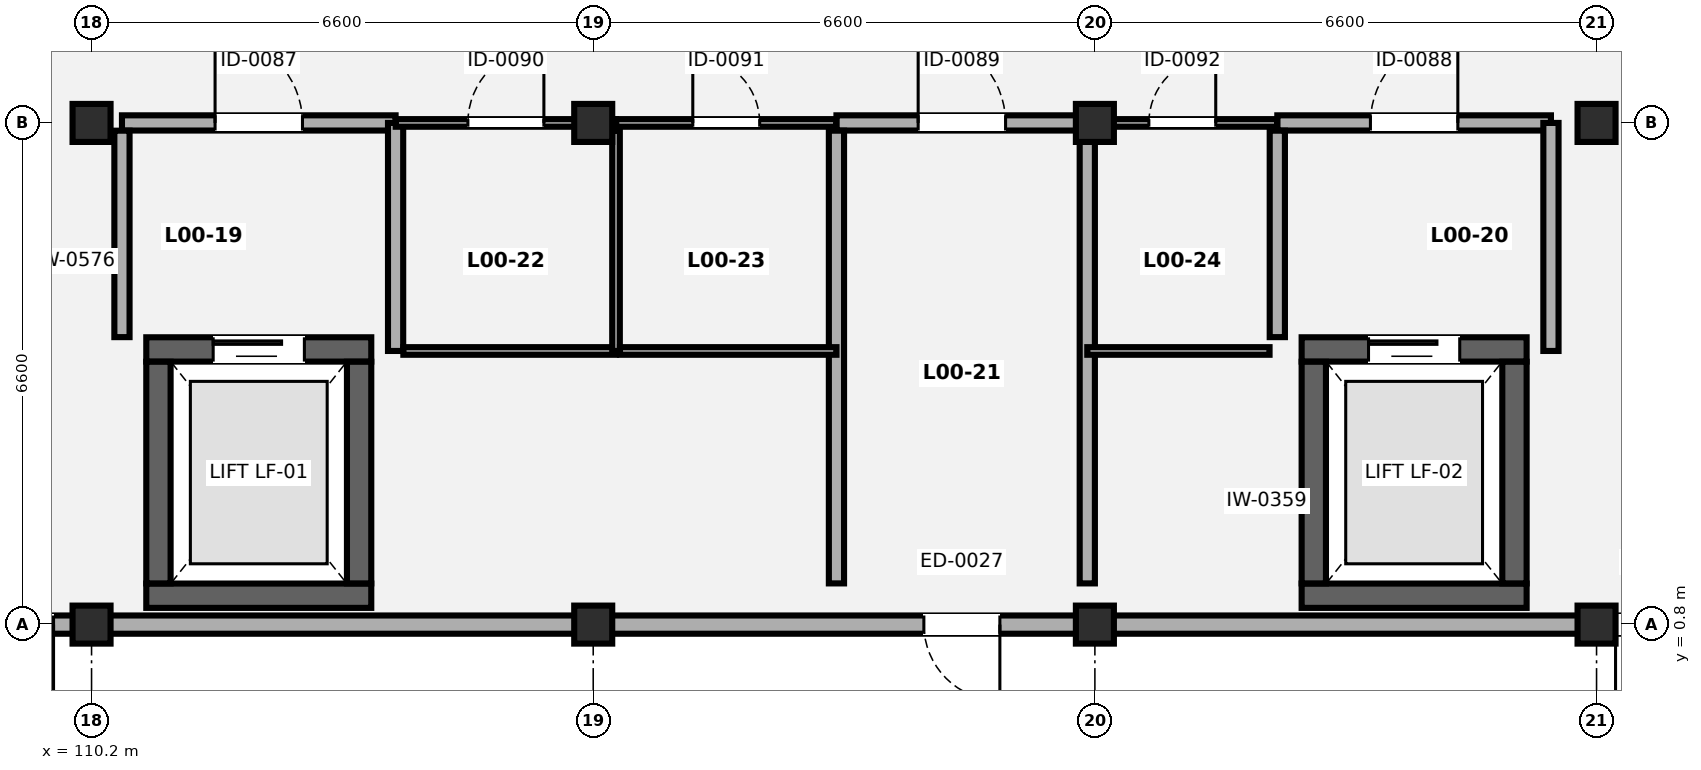
"""IFC4 building model, lengths in metres.
Left out: names, types, materials, properties, quantities, classifications, styles, units other than length and angle.
Written with IfcOpenShell. Run it as: python <this file> out.ifc"""

import sys

from ifc_helpers import new_model, si_unit, direction, frame, frame_2d, origin, origin_2d, place, context, subcontext, project, spatial, rectangle, i_section, extrude, element, fill, save


model = new_model("IFC4")
c1 = context("Model", 3, precision=1e-05, world=origin(), true_north=direction((0.0, 1.0)))
c2 = subcontext(c1, "Body", "Model", "MODEL_VIEW")
j1 = project(units=[si_unit("LENGTHUNIT", "METRE"), si_unit("PLANEANGLEUNIT", "RADIAN")], contexts=[c1])
p1 = place(None, origin())
s1 = spatial("IfcSite", under=j1, at=p1, CompositionType="ELEMENT")
p2 = place(p1, origin())
s2 = spatial("IfcBuilding", under=s1, at=p2, CompositionType="ELEMENT")
p3 = place(p2, origin())
s3 = spatial("IfcBuildingStorey", under=s2, at=p3, CompositionType="ELEMENT", Elevation=0.0)
for number, where, z_axis, x_axis in (
    (1, (110.2, 0.8, 0.0), (0.0, 0.0, 1.0), (1.0, 0.0, 0.0)),
    (2, (110.2, 7.4, 0.0), (0.0, 0.0, 1.0), (1.0, 0.0, 0.0)),
    (3, (116.8, 0.8, 0.0), (0.0, 0.0, 1.0), (1.0, 0.0, 0.0)),
    (4, (116.8, 7.4, 0.0), (0.0, 0.0, 1.0), (1.0, 0.0, 0.0)),
    (5, (123.4, 0.8, 0.0), (0.0, 0.0, 1.0), (1.0, 0.0, 0.0)),
    (6, (123.4, 7.4, 0.0), (0.0, 0.0, 1.0), (1.0, 0.0, 0.0)),
    (7, (130.0, 0.8, 0.0), (0.0, 0.0, 1.0), (1.0, 0.0, 0.0)),
    (8, (130.0, 7.4, 0.0), (0.0, 0.0, 1.0), (1.0, 0.0, 0.0)),
):
    element("IfcColumn", number, at=place(p3, frame(where, z_axis=z_axis, x_axis=x_axis)), inside=s3, PredefinedType="COLUMN", context=c2, shape_type="SweptSolid", body=[
        extrude(i_section(OverallWidth=0.5, OverallDepth=0.5, WebThickness=0.022, FlangeThickness=0.04, FilletRadius=0.016, at=origin_2d()), origin(), (0.0, 0.0, 1.0), 4.9),
    ])
p4 = place(p3, frame((161.952, 0.8, 0.0), z_axis=(0.0, 0.0, 1.0), x_axis=(-1.0, 0.0, 0.0)))
e9 = element("IfcWall", 9, at=p4, inside=s3, PredefinedType="SOLIDWALL", context=c2, shape_type="SweptSolid", body=[
    extrude(rectangle(XDim=58.104, YDim=0.24, at=frame_2d((29.052, 0.0))), origin(), (0.0, 0.0, 1.0), 4.205),
])
p5 = place(p4, frame((52.252, 0.0, 0.0)))
e10 = element("IfcOpeningElement", 10, at=p5, cuts=e9, PredefinedType="OPENING", context=c2, shape_type="SweptSolid", body=[
    extrude(rectangle(XDim=1.25, YDim=2.15, at=frame_2d((0.625, 1.075))), frame((0.0, 0.13, 0.0), z_axis=(0.0, -1.0, 0.0), x_axis=(1.0, 0.0, 0.0)), (0.0, 0.0, 1.0), 0.26),
])
p6 = place(p4, frame((30.452, 0.0, 0.0)))
e11 = element("IfcOpeningElement", 11, at=p6, cuts=e9, PredefinedType="OPENING", context=c2, shape_type="SweptSolid", body=[
    extrude(rectangle(XDim=1.25, YDim=2.15, at=frame_2d((0.625, 1.075))), frame((0.0, 0.13, 0.0), z_axis=(0.0, -1.0, 0.0), x_axis=(1.0, 0.0, 0.0)), (0.0, 0.0, 1.0), 0.26),
])
p7 = place(p4, frame((39.802, 0.0, 0.0)))
e12 = element("IfcOpeningElement", 12, at=p7, cuts=e9, PredefinedType="OPENING", context=c2, shape_type="SweptSolid", body=[
    extrude(rectangle(XDim=1.0, YDim=2.1, at=frame_2d((0.5, 1.05))), frame((0.0, 0.13, 0.0), z_axis=(0.0, -1.0, 0.0), x_axis=(1.0, 0.0, 0.0)), (0.0, 0.0, 1.0), 0.26),
])
p8 = place(p4, frame((14.152, 0.0, 0.0)))
e13 = element("IfcOpeningElement", 13, at=p8, cuts=e9, PredefinedType="OPENING", context=c2, shape_type="SweptSolid", body=[
    extrude(rectangle(XDim=2.8, YDim=2.25, at=frame_2d((1.4, 1.125))), frame((0.0, 0.13, 0.0), z_axis=(0.0, -1.0, 0.0), x_axis=(1.0, 0.0, 0.0)), (0.0, 0.0, 1.0), 0.26),
])
p9 = place(p3, frame((110.92, 1.18, 0.0), z_axis=(0.0, 0.0, 1.0), x_axis=(1.0, 0.0, 0.0)))
e14 = element("IfcWall", 14, at=p9, inside=s3, PredefinedType="SHEAR", context=c2, shape_type="SweptSolid", body=[
    extrude(rectangle(XDim=2.96, YDim=0.32, at=frame_2d((1.48, 0.0))), origin(), (0.0, 0.0, 1.0), 4.72),
])
p10 = place(p3, frame((110.92, 4.42, 0.0), z_axis=(0.0, 0.0, 1.0), x_axis=(1.0, 0.0, 0.0)))
e15 = element("IfcWall", 15, at=p10, inside=s3, PredefinedType="SHEAR", context=c2, shape_type="SweptSolid", body=[
    extrude(rectangle(XDim=2.96, YDim=0.32, at=frame_2d((1.48, 0.0))), origin(), (0.0, 0.0, 1.0), 4.72),
])
p11 = place(p10, frame((0.88, 0.0, 0.0)))
e16 = element("IfcOpeningElement", 16, at=p11, cuts=e15, PredefinedType="OPENING", context=c2, shape_type="SweptSolid", body=[
    extrude(rectangle(XDim=1.2, YDim=2.2, at=frame_2d((0.6, 1.1))), frame((0.0, 0.17, 0.0), z_axis=(0.0, -1.0, 0.0), x_axis=(1.0, 0.0, 0.0)), (0.0, 0.0, 1.0), 0.34),
])
for number, where, z_axis, x_axis in (
    (17, (111.08, 1.342, 0.0), (0.0, 0.0, 1.0), (0.0, 1.0, 0.0)),
    (18, (113.72, 1.342, 0.0), (0.0, 0.0, 1.0), (0.0, 1.0, 0.0)),
):
    element("IfcWall", number, at=place(p3, frame(where, z_axis=z_axis, x_axis=x_axis)), inside=s3, PredefinedType="SHEAR", context=c2, shape_type="SweptSolid", body=[
        extrude(rectangle(XDim=2.916, YDim=0.32, at=frame_2d((1.458, 0.0))), origin(), (0.0, 0.0, 1.0), 4.72),
    ])
p12 = place(p3, frame((126.12, 1.18, 0.0), z_axis=(0.0, 0.0, 1.0), x_axis=(1.0, 0.0, 0.0)))
e19 = element("IfcWall", 19, at=p12, inside=s3, PredefinedType="SHEAR", context=c2, shape_type="SweptSolid", body=[
    extrude(rectangle(XDim=2.96, YDim=0.32, at=frame_2d((1.48, 0.0))), origin(), (0.0, 0.0, 1.0), 4.72),
])
p13 = place(p3, frame((126.12, 4.42, 0.0), z_axis=(0.0, 0.0, 1.0), x_axis=(1.0, 0.0, 0.0)))
e20 = element("IfcWall", 20, at=p13, inside=s3, PredefinedType="SHEAR", context=c2, shape_type="SweptSolid", body=[
    extrude(rectangle(XDim=2.96, YDim=0.32, at=frame_2d((1.48, 0.0))), origin(), (0.0, 0.0, 1.0), 4.72),
])
p14 = place(p13, frame((0.88, 0.0, 0.0)))
e21 = element("IfcOpeningElement", 21, at=p14, cuts=e20, PredefinedType="OPENING", context=c2, shape_type="SweptSolid", body=[
    extrude(rectangle(XDim=1.2, YDim=2.2, at=frame_2d((0.6, 1.1))), frame((0.0, 0.17, 0.0), z_axis=(0.0, -1.0, 0.0), x_axis=(1.0, 0.0, 0.0)), (0.0, 0.0, 1.0), 0.34),
])
for number, where, z_axis, x_axis in (
    (22, (126.28, 1.342, 0.0), (0.0, 0.0, 1.0), (0.0, 1.0, 0.0)),
    (23, (128.92, 1.342, 0.0), (0.0, 0.0, 1.0), (0.0, 1.0, 0.0)),
):
    element("IfcWall", number, at=place(p3, frame(where, z_axis=z_axis, x_axis=x_axis)), inside=s3, PredefinedType="SHEAR", context=c2, shape_type="SweptSolid", body=[
        extrude(rectangle(XDim=2.916, YDim=0.32, at=frame_2d((1.458, 0.0))), origin(), (0.0, 0.0, 1.0), 4.72),
    ])
p15 = place(p3, frame((110.6, 7.4, 0.0), z_axis=(0.0, 0.0, 1.0), x_axis=(1.0, 0.0, 0.0)))
e24 = element("IfcWall", 24, at=p15, inside=s3, PredefinedType="SOLIDWALL", context=c2, shape_type="SweptSolid", body=[
    extrude(rectangle(XDim=3.6, YDim=0.2, at=frame_2d((1.8, 0.0))), origin(), (0.0, 0.0, 1.0), 3.993),
])
p16 = place(p15, frame((1.225, 0.0, 0.0)))
e25 = element("IfcOpeningElement", 25, at=p16, cuts=e24, PredefinedType="OPENING", context=c2, shape_type="SweptSolid", body=[
    extrude(rectangle(XDim=1.15, YDim=2.15, at=frame_2d((0.575, 1.075))), frame((0.0, 0.11, 0.0), z_axis=(0.0, -1.0, 0.0), x_axis=(1.0, 0.0, 0.0)), (0.0, 0.0, 1.0), 0.22),
])
p17 = place(p3, frame((110.6, 4.582, 0.0), z_axis=(0.0, 0.0, 1.0), x_axis=(0.0, 1.0, 0.0)))
e26 = element("IfcWall", 26, at=p17, inside=s3, PredefinedType="SOLIDWALL", context=c2, shape_type="SweptSolid", body=[
    extrude(rectangle(XDim=2.716, YDim=0.2, at=frame_2d((1.358, 0.0))), origin(), (0.0, 0.0, 1.0), 4.72),
])
p18 = place(p3, frame((114.2, 4.4, 0.0), z_axis=(0.0, 0.0, 1.0), x_axis=(0.0, 1.0, 0.0)))
e27 = element("IfcWall", 27, at=p18, inside=s3, PredefinedType="SOLIDWALL", context=c2, shape_type="SweptSolid", body=[
    extrude(rectangle(XDim=3.0, YDim=0.2, at=frame_2d((1.5, 0.0))), origin(), (0.0, 0.0, 1.0), 4.72),
])
p19 = place(p3, frame((125.8, 7.4, 0.0), z_axis=(0.0, 0.0, 1.0), x_axis=(1.0, 0.0, 0.0)))
e28 = element("IfcWall", 28, at=p19, inside=s3, PredefinedType="SOLIDWALL", context=c2, shape_type="SweptSolid", body=[
    extrude(rectangle(XDim=3.6, YDim=0.2, at=frame_2d((1.8, 0.0))), origin(), (0.0, 0.0, 1.0), 3.993),
])
p20 = place(p19, frame((1.225, 0.0, 0.0)))
e29 = element("IfcOpeningElement", 29, at=p20, cuts=e28, PredefinedType="OPENING", context=c2, shape_type="SweptSolid", body=[
    extrude(rectangle(XDim=1.15, YDim=2.15, at=frame_2d((0.575, 1.075))), frame((0.0, 0.11, 0.0), z_axis=(0.0, -1.0, 0.0), x_axis=(1.0, 0.0, 0.0)), (0.0, 0.0, 1.0), 0.22),
])
p21 = place(p3, frame((125.8, 4.582, 0.0), z_axis=(0.0, 0.0, 1.0), x_axis=(0.0, 1.0, 0.0)))
e30 = element("IfcWall", 30, at=p21, inside=s3, PredefinedType="SOLIDWALL", context=c2, shape_type="SweptSolid", body=[
    extrude(rectangle(XDim=2.716, YDim=0.2, at=frame_2d((1.358, 0.0))), origin(), (0.0, 0.0, 1.0), 4.72),
])
p22 = place(p3, frame((129.4, 4.4, 0.0), z_axis=(0.0, 0.0, 1.0), x_axis=(0.0, 1.0, 0.0)))
e31 = element("IfcWall", 31, at=p22, inside=s3, PredefinedType="SOLIDWALL", context=c2, shape_type="SweptSolid", body=[
    extrude(rectangle(XDim=3.0, YDim=0.2, at=frame_2d((1.5, 0.0))), origin(), (0.0, 0.0, 1.0), 4.72),
])
p23 = place(p3, frame((120.0, 7.4, 0.0), z_axis=(0.0, 0.0, 1.0), x_axis=(1.0, 0.0, 0.0)))
e32 = element("IfcWall", 32, at=p23, inside=s3, PredefinedType="SOLIDWALL", context=c2, shape_type="SweptSolid", body=[
    extrude(rectangle(XDim=3.3, YDim=0.2, at=frame_2d((1.65, 0.0))), origin(), (0.0, 0.0, 1.0), 3.993),
])
p24 = place(p23, frame((1.075, 0.0, 0.0)))
e33 = element("IfcOpeningElement", 33, at=p24, cuts=e32, PredefinedType="OPENING", context=c2, shape_type="SweptSolid", body=[
    extrude(rectangle(XDim=1.15, YDim=2.15, at=frame_2d((0.575, 1.075))), frame((0.0, 0.11, 0.0), z_axis=(0.0, -1.0, 0.0), x_axis=(1.0, 0.0, 0.0)), (0.0, 0.0, 1.0), 0.22),
])
p25 = place(p3, frame((120.0, 1.342, 0.0), z_axis=(0.0, 0.0, 1.0), x_axis=(0.0, 1.0, 0.0)))
e34 = element("IfcWall", 34, at=p25, inside=s3, PredefinedType="SOLIDWALL", context=c2, shape_type="SweptSolid", body=[
    extrude(rectangle(XDim=5.956, YDim=0.2, at=frame_2d((2.978, 0.0))), origin(), (0.0, 0.0, 1.0), 4.72),
])
p26 = place(p3, frame((123.3, 1.342, 0.0), z_axis=(0.0, 0.0, 1.0), x_axis=(0.0, 1.0, 0.0)))
e35 = element("IfcWall", 35, at=p26, inside=s3, PredefinedType="SOLIDWALL", context=c2, shape_type="SweptSolid", body=[
    extrude(rectangle(XDim=5.956, YDim=0.2, at=frame_2d((2.978, 0.0))), origin(), (0.0, 0.0, 1.0), 4.072),
])
p27 = place(p3, frame((114.302, 4.4, 0.0), z_axis=(0.0, 0.0, 1.0), x_axis=(1.0, 0.0, 0.0)))
e36 = element("IfcWall", 36, at=p27, inside=s3, PredefinedType="PARTITIONING", context=c2, shape_type="SweptSolid", body=[
    extrude(rectangle(XDim=2.798, YDim=0.1, at=frame_2d((1.399, 0.0))), origin(), (0.0, 0.0, 1.0), 4.72),
])
p28 = place(p3, frame((114.202, 7.4, 0.0), z_axis=(0.0, 0.0, 1.0), x_axis=(1.0, 0.0, 0.0)))
e37 = element("IfcWall", 37, at=p28, inside=s3, PredefinedType="PARTITIONING", context=c2, shape_type="SweptSolid", body=[
    extrude(rectangle(XDim=2.898, YDim=0.1, at=frame_2d((1.449, 0.0))), origin(), (0.0, 0.0, 1.0), 3.993),
])
p29 = place(p28, frame((0.949, 0.0, 0.0)))
e38 = element("IfcOpeningElement", 38, at=p29, cuts=e37, PredefinedType="OPENING", context=c2, shape_type="SweptSolid", body=[
    extrude(rectangle(XDim=1.0, YDim=2.1, at=frame_2d((0.5, 1.05))), frame((0.0, 0.06, 0.0), z_axis=(0.0, -1.0, 0.0), x_axis=(1.0, 0.0, 0.0)), (0.0, 0.0, 1.0), 0.12),
])
p30 = place(p3, frame((117.1, 4.4, 0.0), z_axis=(0.0, 0.0, 1.0), x_axis=(0.0, 1.0, 0.0)))
e39 = element("IfcWall", 39, at=p30, inside=s3, PredefinedType="PARTITIONING", context=c2, shape_type="SweptSolid", body=[
    extrude(rectangle(XDim=2.898, YDim=0.1, at=frame_2d((1.449, 0.0))), origin(), (0.0, 0.0, 1.0), 4.72),
])
p31 = place(p3, frame((117.152, 4.4, 0.0), z_axis=(0.0, 0.0, 1.0), x_axis=(1.0, 0.0, 0.0)))
e40 = element("IfcWall", 40, at=p31, inside=s3, PredefinedType="PARTITIONING", context=c2, shape_type="SweptSolid", body=[
    extrude(rectangle(XDim=2.848, YDim=0.1, at=frame_2d((1.424, 0.0))), origin(), (0.0, 0.0, 1.0), 4.72),
])
p32 = place(p3, frame((117.102, 7.4, 0.0), z_axis=(0.0, 0.0, 1.0), x_axis=(1.0, 0.0, 0.0)))
e41 = element("IfcWall", 41, at=p32, inside=s3, PredefinedType="PARTITIONING", context=c2, shape_type="SweptSolid", body=[
    extrude(rectangle(XDim=2.896, YDim=0.1, at=frame_2d((1.448, 0.0))), origin(), (0.0, 0.0, 1.0), 3.993),
])
p33 = place(p32, frame((1.008, 0.0, 0.0)))
e42 = element("IfcOpeningElement", 42, at=p33, cuts=e41, PredefinedType="OPENING", context=c2, shape_type="SweptSolid", body=[
    extrude(rectangle(XDim=0.88, YDim=2.08, at=frame_2d((0.44, 1.04))), frame((0.0, 0.06, 0.0), z_axis=(0.0, -1.0, 0.0), x_axis=(1.0, 0.0, 0.0)), (0.0, 0.0, 1.0), 0.12),
])
p34 = place(p3, frame((123.3, 4.4, 0.0), z_axis=(0.0, 0.0, 1.0), x_axis=(1.0, 0.0, 0.0)))
e43 = element("IfcWall", 43, at=p34, inside=s3, PredefinedType="PARTITIONING", context=c2, shape_type="SweptSolid", body=[
    extrude(rectangle(XDim=2.398, YDim=0.1, at=frame_2d((1.199, 0.0))), origin(), (0.0, 0.0, 1.0), 4.72),
])
p35 = place(p3, frame((123.302, 7.4, 0.0), z_axis=(0.0, 0.0, 1.0), x_axis=(1.0, 0.0, 0.0)))
e44 = element("IfcWall", 44, at=p35, inside=s3, PredefinedType="PARTITIONING", context=c2, shape_type="SweptSolid", body=[
    extrude(rectangle(XDim=2.496, YDim=0.1, at=frame_2d((1.248, 0.0))), origin(), (0.0, 0.0, 1.0), 3.993),
])
p36 = place(p35, frame((0.808, 0.0, 0.0)))
e45 = element("IfcOpeningElement", 45, at=p36, cuts=e44, PredefinedType="OPENING", context=c2, shape_type="SweptSolid", body=[
    extrude(rectangle(XDim=0.88, YDim=2.08, at=frame_2d((0.44, 1.04))), frame((0.0, 0.06, 0.0), z_axis=(0.0, -1.0, 0.0), x_axis=(1.0, 0.0, 0.0)), (0.0, 0.0, 1.0), 0.12),
])
p37 = place(p5, origin())
e46 = element("IfcDoor", 46, at=p37, inside=s3, OperationType="SINGLE_SWING_LEFT", PredefinedType="DOOR", context=c2, shape_type="SweptSolid", body=[
    extrude(rectangle(XDim=1.25, YDim=2.15, at=frame_2d((0.625, 1.075))), frame((0.0, 0.025, 0.0), z_axis=(0.0, -1.0, 0.0), x_axis=(1.0, 0.0, 0.0)), (0.0, 0.0, 1.0), 0.05),
])
fill(e10, e46)
p38 = place(p6, origin())
e47 = element("IfcDoor", 47, at=p38, inside=s3, OperationType="SINGLE_SWING_RIGHT", PredefinedType="DOOR", context=c2, shape_type="SweptSolid", body=[
    extrude(rectangle(XDim=1.25, YDim=2.15, at=frame_2d((0.625, 1.075))), frame((0.0, 0.025, 0.0), z_axis=(0.0, -1.0, 0.0), x_axis=(1.0, 0.0, 0.0)), (0.0, 0.0, 1.0), 0.05),
])
fill(e11, e47)
p39 = place(p7, origin())
e48 = element("IfcDoor", 48, at=p39, inside=s3, OperationType="SINGLE_SWING_LEFT", PredefinedType="DOOR", context=c2, shape_type="SweptSolid", body=[
    extrude(rectangle(XDim=1.0, YDim=2.1, at=frame_2d((0.5, 1.05))), frame((0.0, 0.025, 0.0), z_axis=(0.0, -1.0, 0.0), x_axis=(1.0, 0.0, 0.0)), (0.0, 0.0, 1.0), 0.05),
])
fill(e12, e48)
p40 = place(p11, origin())
e49 = element("IfcDoor", 49, at=p40, inside=s3, OperationType="SLIDING_TO_LEFT", PredefinedType="DOOR", context=c2, shape_type="SweptSolid", body=[
    extrude(rectangle(XDim=1.2, YDim=2.2, at=frame_2d((0.6, 1.1))), frame((0.0, 0.025, 0.0), z_axis=(0.0, -1.0, 0.0), x_axis=(1.0, 0.0, 0.0)), (0.0, 0.0, 1.0), 0.05),
])
fill(e16, e49)
p41 = place(p14, origin())
e50 = element("IfcDoor", 50, at=p41, inside=s3, OperationType="SLIDING_TO_LEFT", PredefinedType="DOOR", context=c2, shape_type="SweptSolid", body=[
    extrude(rectangle(XDim=1.2, YDim=2.2, at=frame_2d((0.6, 1.1))), frame((0.0, 0.025, 0.0), z_axis=(0.0, -1.0, 0.0), x_axis=(1.0, 0.0, 0.0)), (0.0, 0.0, 1.0), 0.05),
])
fill(e21, e50)
p42 = place(p16, origin())
e51 = element("IfcDoor", 51, at=p42, inside=s3, OperationType="SINGLE_SWING_LEFT", PredefinedType="DOOR", context=c2, shape_type="SweptSolid", body=[
    extrude(rectangle(XDim=1.15, YDim=2.15, at=frame_2d((0.575, 1.075))), frame((0.0, 0.025, 0.0), z_axis=(0.0, -1.0, 0.0), x_axis=(1.0, 0.0, 0.0)), (0.0, 0.0, 1.0), 0.05),
])
fill(e25, e51)
p43 = place(p20, origin())
e52 = element("IfcDoor", 52, at=p43, inside=s3, OperationType="SINGLE_SWING_RIGHT", PredefinedType="DOOR", context=c2, shape_type="SweptSolid", body=[
    extrude(rectangle(XDim=1.15, YDim=2.15, at=frame_2d((0.575, 1.075))), frame((0.0, 0.025, 0.0), z_axis=(0.0, -1.0, 0.0), x_axis=(1.0, 0.0, 0.0)), (0.0, 0.0, 1.0), 0.05),
])
fill(e29, e52)
p44 = place(p24, origin())
e53 = element("IfcDoor", 53, at=p44, inside=s3, OperationType="SINGLE_SWING_LEFT", PredefinedType="DOOR", context=c2, shape_type="SweptSolid", body=[
    extrude(rectangle(XDim=1.15, YDim=2.15, at=frame_2d((0.575, 1.075))), frame((0.0, 0.025, 0.0), z_axis=(0.0, -1.0, 0.0), x_axis=(1.0, 0.0, 0.0)), (0.0, 0.0, 1.0), 0.05),
])
fill(e33, e53)
p45 = place(p29, origin())
e54 = element("IfcDoor", 54, at=p45, inside=s3, OperationType="SINGLE_SWING_RIGHT", PredefinedType="DOOR", context=c2, shape_type="SweptSolid", body=[
    extrude(rectangle(XDim=1.0, YDim=2.1, at=frame_2d((0.5, 1.05))), frame((0.0, 0.025, 0.0), z_axis=(0.0, -1.0, 0.0), x_axis=(1.0, 0.0, 0.0)), (0.0, 0.0, 1.0), 0.05),
])
fill(e38, e54)
p46 = place(p33, origin())
e55 = element("IfcDoor", 55, at=p46, inside=s3, OperationType="SINGLE_SWING_LEFT", PredefinedType="DOOR", context=c2, shape_type="SweptSolid", body=[
    extrude(rectangle(XDim=0.88, YDim=2.08, at=frame_2d((0.44, 1.04))), frame((0.0, 0.025, 0.0), z_axis=(0.0, -1.0, 0.0), x_axis=(1.0, 0.0, 0.0)), (0.0, 0.0, 1.0), 0.05),
])
fill(e42, e55)
p47 = place(p36, origin())
e56 = element("IfcDoor", 56, at=p47, inside=s3, OperationType="SINGLE_SWING_RIGHT", PredefinedType="DOOR", context=c2, shape_type="SweptSolid", body=[
    extrude(rectangle(XDim=0.88, YDim=2.08, at=frame_2d((0.44, 1.04))), frame((0.0, 0.025, 0.0), z_axis=(0.0, -1.0, 0.0), x_axis=(1.0, 0.0, 0.0)), (0.0, 0.0, 1.0), 0.05),
])
fill(e45, e56)
save(model, sys.argv[1])
